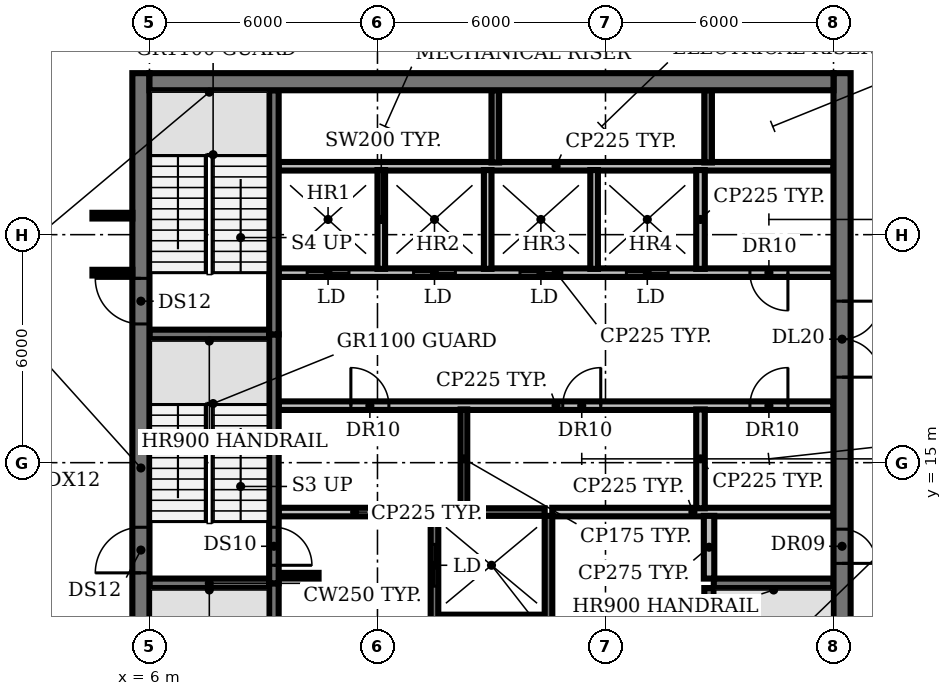
"""IFC4 building model, lengths in metres.
Left out: names, types, materials, properties, quantities, classifications, styles, units other than length and angle.
Written with IfcOpenShell. Run it as: python <this file> out.ifc"""

import sys

from ifc_helpers import new_model, si_unit, direction, frame, frame_2d, origin, place, context, subcontext, project, spatial, rectangle, extrude, element, fill, save


model = new_model("IFC4")
c1 = context("Model", 3, precision=1e-05, world=origin(), true_north=direction((0.0, 1.0)))
c2 = subcontext(c1, "Body", "Model", "MODEL_VIEW")
j1 = project(units=[si_unit("LENGTHUNIT", "METRE"), si_unit("PLANEANGLEUNIT", "RADIAN")], contexts=[c1])
p1 = place(None, origin())
s1 = spatial("IfcSite", under=j1, at=p1, CompositionType="ELEMENT")
p2 = place(p1, origin())
s2 = spatial("IfcBuilding", under=s1, at=p2, CompositionType="ELEMENT")
p3 = place(p2, frame((0.0, 0.0, 251.6)))
s3 = spatial("IfcBuildingStorey", under=s2, at=p3, CompositionType="ELEMENT", Elevation=251.6)
p4 = place(p3, frame((13.6, 10.9, 0.0), z_axis=(0.0, 0.0, 1.0), x_axis=(1.0, 0.0, 0.0)))
e1 = element("IfcWall", 1, at=p4, inside=s3, PredefinedType="SHEAR", context=c2, shape_type="SweptSolid", body=[
    extrude(rectangle(XDim=2.8, YDim=0.2, at=frame_2d((1.4, 0.0))), origin(), (0.0, 0.0, 1.0), 3.8),
])
for number, where, z_axis, x_axis in (
    (2, (6.0, 11.825, 0.0), (0.0, 0.0, 1.0), (1.0, 0.0, 0.0)),
    (3, (20.85, 11.825, 0.0), (0.0, 0.0, 1.0), (1.0, 0.0, 0.0)),
):
    element("IfcWall", number, at=place(p3, frame(where, z_axis=z_axis, x_axis=x_axis)), inside=s3, PredefinedType="SHEAR", context=c2, shape_type="SweptSolid", body=[
        extrude(rectangle(XDim=3.15, YDim=0.25, at=frame_2d((1.575, 0.0))), origin(), (0.0, 0.0, 1.0), 3.8),
    ])
p5 = place(p3, frame((9.4, 12.025, 0.0), z_axis=(0.0, 0.0, 1.0), x_axis=(1.0, 0.0, 0.0)))
e4 = element("IfcWall", 4, at=p5, inside=s3, PredefinedType="SHEAR", context=c2, shape_type="SweptSolid", body=[
    extrude(rectangle(XDim=1.05, YDim=0.15, at=frame_2d((0.525, 0.0))), origin(), (0.0, 0.0, 1.0), 3.8),
])
p6 = place(p3, frame((9.4, 13.7, 0.0), z_axis=(0.0, 0.0, 1.0), x_axis=(1.0, 0.0, 0.0)))
e5 = element("IfcWall", 5, at=p6, inside=s3, PredefinedType="PARTITIONING", context=c2, shape_type="SweptSolid", body=[
    extrude(rectangle(XDim=4.0, YDim=0.225, at=frame_2d((2.0, 0.0))), origin(), (0.0, 0.0, 1.0), 3.8),
])
p7 = place(p3, frame((13.6, 13.7, 0.0), z_axis=(0.0, 0.0, 1.0), x_axis=(1.0, 0.0, 0.0)))
e6 = element("IfcWall", 6, at=p7, inside=s3, PredefinedType="SHEAR", context=c2, shape_type="SweptSolid", body=[
    extrude(rectangle(XDim=2.8, YDim=0.2, at=frame_2d((1.4, 0.0))), origin(), (0.0, 0.0, 1.0), 3.8),
])
p8 = place(p3, frame((16.6, 13.7, 0.0), z_axis=(0.0, 0.0, 1.0), x_axis=(1.0, 0.0, 0.0)))
e7 = element("IfcWall", 7, at=p8, inside=s3, PredefinedType="PARTITIONING", context=c2, shape_type="SweptSolid", body=[
    extrude(rectangle(XDim=7.4, YDim=0.225, at=frame_2d((3.7, 0.0))), origin(), (0.0, 0.0, 1.0), 3.8),
])
p9 = place(p3, frame((9.4, 16.5, 0.0), z_axis=(0.0, 0.0, 1.0), x_axis=(1.0, 0.0, 0.0)))
e8 = element("IfcWall", 8, at=p9, inside=s3, PredefinedType="PARTITIONING", context=c2, shape_type="SweptSolid", body=[
    extrude(rectangle(XDim=14.6, YDim=0.225, at=frame_2d((7.3, 0.0))), origin(), (0.0, 0.0, 1.0), 3.8),
])
p10 = place(p9, frame((1.9, 0.0, 0.0)))
e9 = element("IfcOpeningElement", 9, at=p10, cuts=e8, PredefinedType="OPENING", context=c2, shape_type="SweptSolid", body=[
    extrude(rectangle(XDim=1.0, YDim=2.1, at=frame_2d((0.5, 1.05))), frame((0.0, 0.123, 0.0), z_axis=(0.0, -1.0, 0.0), x_axis=(1.0, 0.0, 0.0)), (0.0, 0.0, 1.0), 0.245),
])
p11 = place(p9, frame((7.475, 0.0, 0.0)))
e10 = element("IfcOpeningElement", 10, at=p11, cuts=e8, PredefinedType="OPENING", context=c2, shape_type="SweptSolid", body=[
    extrude(rectangle(XDim=1.0, YDim=2.1, at=frame_2d((0.5, 1.05))), frame((0.0, 0.123, 0.0), z_axis=(0.0, -1.0, 0.0), x_axis=(1.0, 0.0, 0.0)), (0.0, 0.0, 1.0), 0.245),
])
p12 = place(p9, frame((12.4, 0.0, 0.0)))
e11 = element("IfcOpeningElement", 11, at=p12, cuts=e8, PredefinedType="OPENING", context=c2, shape_type="SweptSolid", body=[
    extrude(rectangle(XDim=1.0, YDim=2.1, at=frame_2d((0.5, 1.05))), frame((0.0, 0.123, 0.0), z_axis=(0.0, -1.0, 0.0), x_axis=(1.0, 0.0, 0.0)), (0.0, 0.0, 1.0), 0.245),
])
p13 = place(p3, frame((6.0, 18.375, 0.0), z_axis=(0.0, 0.0, 1.0), x_axis=(1.0, 0.0, 0.0)))
e12 = element("IfcWall", 12, at=p13, inside=s3, PredefinedType="SHEAR", context=c2, shape_type="SweptSolid", body=[
    extrude(rectangle(XDim=3.15, YDim=0.25, at=frame_2d((1.575, 0.0))), origin(), (0.0, 0.0, 1.0), 3.8),
])
p14 = place(p3, frame((24.0, 20.0, 0.0), z_axis=(0.0, 0.0, 1.0), x_axis=(-1.0, 0.0, 0.0)))
e13 = element("IfcWall", 13, at=p14, inside=s3, PredefinedType="PARTITIONING", context=c2, shape_type="SweptSolid", body=[
    extrude(rectangle(XDim=14.6, YDim=0.225, at=frame_2d((7.3, 0.0))), origin(), (0.0, 0.0, 1.0), 3.8),
])
p15 = place(p14, frame((12.75, 0.0, 0.0)))
e14 = element("IfcOpeningElement", 14, at=p15, cuts=e13, PredefinedType="OPENING", context=c2, shape_type="SweptSolid", body=[
    extrude(rectangle(XDim=1.1, YDim=2.1, at=frame_2d((0.55, 1.05))), frame((0.0, 0.123, 0.0), z_axis=(0.0, -1.0, 0.0), x_axis=(1.0, 0.0, 0.0)), (0.0, 0.0, 1.0), 0.245),
])
p16 = place(p14, frame((9.95, 0.0, 0.0)))
e15 = element("IfcOpeningElement", 15, at=p16, cuts=e13, PredefinedType="OPENING", context=c2, shape_type="SweptSolid", body=[
    extrude(rectangle(XDim=1.1, YDim=2.1, at=frame_2d((0.55, 1.05))), frame((0.0, 0.123, 0.0), z_axis=(0.0, -1.0, 0.0), x_axis=(1.0, 0.0, 0.0)), (0.0, 0.0, 1.0), 0.245),
])
p17 = place(p14, frame((7.15, 0.0, 0.0)))
e16 = element("IfcOpeningElement", 16, at=p17, cuts=e13, PredefinedType="OPENING", context=c2, shape_type="SweptSolid", body=[
    extrude(rectangle(XDim=1.1, YDim=2.1, at=frame_2d((0.55, 1.05))), frame((0.0, 0.123, 0.0), z_axis=(0.0, -1.0, 0.0), x_axis=(1.0, 0.0, 0.0)), (0.0, 0.0, 1.0), 0.245),
])
p18 = place(p14, frame((4.35, 0.0, 0.0)))
e17 = element("IfcOpeningElement", 17, at=p18, cuts=e13, PredefinedType="OPENING", context=c2, shape_type="SweptSolid", body=[
    extrude(rectangle(XDim=1.1, YDim=2.1, at=frame_2d((0.55, 1.05))), frame((0.0, 0.123, 0.0), z_axis=(0.0, -1.0, 0.0), x_axis=(1.0, 0.0, 0.0)), (0.0, 0.0, 1.0), 0.245),
])
p19 = place(p14, frame((1.2, 0.0, 0.0)))
e18 = element("IfcOpeningElement", 18, at=p19, cuts=e13, PredefinedType="OPENING", context=c2, shape_type="SweptSolid", body=[
    extrude(rectangle(XDim=1.0, YDim=2.1, at=frame_2d((0.5, 1.05))), frame((0.0, 0.123, 0.0), z_axis=(0.0, -1.0, 0.0), x_axis=(1.0, 0.0, 0.0)), (0.0, 0.0, 1.0), 0.245),
])
p20 = place(p3, frame((9.4, 22.8, 0.0), z_axis=(0.0, 0.0, 1.0), x_axis=(1.0, 0.0, 0.0)))
e19 = element("IfcWall", 19, at=p20, inside=s3, PredefinedType="PARTITIONING", context=c2, shape_type="SweptSolid", body=[
    extrude(rectangle(XDim=14.6, YDim=0.225, at=frame_2d((7.3, 0.0))), origin(), (0.0, 0.0, 1.0), 3.8),
])
p21 = place(p3, frame((9.275, 11.825, 0.0), z_axis=(0.0, 0.0, 1.0), x_axis=(0.0, -1.0, 0.0)))
e20 = element("IfcWall", 20, at=p21, inside=s3, PredefinedType="SHEAR", context=c2, shape_type="SweptSolid", body=[
    extrude(rectangle(XDim=6.425, YDim=0.25, at=frame_2d((3.212, 0.0))), origin(), (0.0, 0.0, 1.0), 3.8),
])
p22 = place(p21, frame((5.075, 0.0, 0.0)))
e21 = element("IfcOpeningElement", 21, at=p22, cuts=e20, PredefinedType="OPENING", context=c2, shape_type="SweptSolid", body=[
    extrude(rectangle(XDim=1.0, YDim=2.1, at=frame_2d((0.5, 1.05))), frame((0.0, 0.135, 0.0), z_axis=(0.0, -1.0, 0.0), x_axis=(1.0, 0.0, 0.0)), (0.0, 0.0, 1.0), 0.27),
])
p23 = place(p3, frame((9.275, 18.375, 0.0), z_axis=(0.0, 0.0, 1.0), x_axis=(0.0, -1.0, 0.0)))
e22 = element("IfcWall", 22, at=p23, inside=s3, PredefinedType="SHEAR", context=c2, shape_type="SweptSolid", body=[
    extrude(rectangle(XDim=6.55, YDim=0.25, at=frame_2d((3.275, 0.0))), origin(), (0.0, 0.0, 1.0), 3.8),
])
p24 = place(p23, frame((5.075, 0.0, 0.0)))
e23 = element("IfcOpeningElement", 23, at=p24, cuts=e22, PredefinedType="OPENING", context=c2, shape_type="SweptSolid", body=[
    extrude(rectangle(XDim=1.0, YDim=2.1, at=frame_2d((0.5, 1.05))), frame((0.0, 0.135, 0.0), z_axis=(0.0, -1.0, 0.0), x_axis=(1.0, 0.0, 0.0)), (0.0, 0.0, 1.0), 0.27),
])
p25 = place(p3, frame((9.275, 18.375, 0.0), z_axis=(0.0, 0.0, 1.0), x_axis=(0.0, 1.0, 0.0)))
e24 = element("IfcWall", 24, at=p25, inside=s3, PredefinedType="SHEAR", context=c2, shape_type="SweptSolid", body=[
    extrude(rectangle(XDim=6.425, YDim=0.25, at=frame_2d((3.212, 0.0))), origin(), (0.0, 0.0, 1.0), 3.8),
])
p26 = place(p3, frame((12.1, 20.1, 0.0), z_axis=(0.0, 0.0, 1.0), x_axis=(0.0, 1.0, 0.0)))
e25 = element("IfcWall", 25, at=p26, inside=s3, PredefinedType="SOLIDWALL", context=c2, shape_type="SweptSolid", body=[
    extrude(rectangle(XDim=2.6, YDim=0.2, at=frame_2d((1.3, 0.0))), origin(), (0.0, 0.0, 1.0), 3.8),
])
p27 = place(p3, frame((13.5, 5.4, 0.0), z_axis=(0.0, 0.0, 1.0), x_axis=(0.0, 1.0, 0.0)))
e26 = element("IfcWall", 26, at=p27, inside=s3, PredefinedType="SHEAR", context=c2, shape_type="SweptSolid", body=[
    extrude(rectangle(XDim=8.2, YDim=0.2, at=frame_2d((4.1, 0.0))), origin(), (0.0, 0.0, 1.0), 3.8),
])
p28 = place(p27, frame((0.75, 0.0, 0.0)))
e27 = element("IfcOpeningElement", 27, at=p28, cuts=e26, PredefinedType="OPENING", context=c2, shape_type="SweptSolid", body=[
    extrude(rectangle(XDim=1.1, YDim=2.1, at=frame_2d((0.55, 1.05))), frame((0.0, 0.11, 0.0), z_axis=(0.0, -1.0, 0.0), x_axis=(1.0, 0.0, 0.0)), (0.0, 0.0, 1.0), 0.22),
])
p29 = place(p27, frame((3.55, 0.0, 0.0)))
e28 = element("IfcOpeningElement", 28, at=p29, cuts=e26, PredefinedType="OPENING", context=c2, shape_type="SweptSolid", body=[
    extrude(rectangle(XDim=1.1, YDim=2.1, at=frame_2d((0.55, 1.05))), frame((0.0, 0.11, 0.0), z_axis=(0.0, -1.0, 0.0), x_axis=(1.0, 0.0, 0.0)), (0.0, 0.0, 1.0), 0.22),
])
p30 = place(p27, frame((6.35, 0.0, 0.0)))
e29 = element("IfcOpeningElement", 29, at=p30, cuts=e26, PredefinedType="OPENING", context=c2, shape_type="SweptSolid", body=[
    extrude(rectangle(XDim=1.1, YDim=2.1, at=frame_2d((0.55, 1.05))), frame((0.0, 0.11, 0.0), z_axis=(0.0, -1.0, 0.0), x_axis=(1.0, 0.0, 0.0)), (0.0, 0.0, 1.0), 0.22),
])
p31 = place(p3, frame((14.275, 13.8, 0.0), z_axis=(0.0, 0.0, 1.0), x_axis=(0.0, 1.0, 0.0)))
e30 = element("IfcWall", 30, at=p31, inside=s3, PredefinedType="PARTITIONING", context=c2, shape_type="SweptSolid", body=[
    extrude(rectangle(XDim=2.6, YDim=0.175, at=frame_2d((1.3, 0.0))), origin(), (0.0, 0.0, 1.0), 3.8),
])
p32 = place(p3, frame((14.9, 20.1, 0.0), z_axis=(0.0, 0.0, 1.0), x_axis=(0.0, 1.0, 0.0)))
e31 = element("IfcWall", 31, at=p32, inside=s3, PredefinedType="SOLIDWALL", context=c2, shape_type="SweptSolid", body=[
    extrude(rectangle(XDim=2.6, YDim=0.2, at=frame_2d((1.3, 0.0))), origin(), (0.0, 0.0, 1.0), 3.8),
])
p33 = place(p3, frame((15.1, 22.9, 0.0), z_axis=(0.0, 0.0, 1.0), x_axis=(0.0, 1.0, 0.0)))
e32 = element("IfcWall", 32, at=p33, inside=s3, PredefinedType="SHEAR", context=c2, shape_type="SweptSolid", body=[
    extrude(rectangle(XDim=1.9, YDim=0.2, at=frame_2d((0.95, 0.0))), origin(), (0.0, 0.0, 1.0), 3.8),
])
p34 = place(p3, frame((16.5, 5.4, 0.0), z_axis=(0.0, 0.0, 1.0), x_axis=(0.0, 1.0, 0.0)))
e33 = element("IfcWall", 33, at=p34, inside=s3, PredefinedType="SHEAR", context=c2, shape_type="SweptSolid", body=[
    extrude(rectangle(XDim=8.2, YDim=0.2, at=frame_2d((4.1, 0.0))), origin(), (0.0, 0.0, 1.0), 3.8),
])
p35 = place(p3, frame((17.7, 20.1, 0.0), z_axis=(0.0, 0.0, 1.0), x_axis=(0.0, 1.0, 0.0)))
e34 = element("IfcWall", 34, at=p35, inside=s3, PredefinedType="SOLIDWALL", context=c2, shape_type="SweptSolid", body=[
    extrude(rectangle(XDim=2.6, YDim=0.2, at=frame_2d((1.3, 0.0))), origin(), (0.0, 0.0, 1.0), 3.8),
])
for number, where, z_axis, x_axis in (
    (35, (20.5, 13.8, 0.0), (0.0, 0.0, 1.0), (0.0, 1.0, 0.0)),
    (36, (20.5, 20.1, 0.0), (0.0, 0.0, 1.0), (0.0, 1.0, 0.0)),
):
    element("IfcWall", number, at=place(p3, frame(where, z_axis=z_axis, x_axis=x_axis)), inside=s3, PredefinedType="PARTITIONING", context=c2, shape_type="SweptSolid", body=[
        extrude(rectangle(XDim=2.6, YDim=0.225, at=frame_2d((1.3, 0.0))), origin(), (0.0, 0.0, 1.0), 3.8),
    ])
p36 = place(p3, frame((20.7, 22.9, 0.0), z_axis=(0.0, 0.0, 1.0), x_axis=(0.0, 1.0, 0.0)))
e37 = element("IfcWall", 37, at=p36, inside=s3, PredefinedType="SHEAR", context=c2, shape_type="SweptSolid", body=[
    extrude(rectangle(XDim=1.9, YDim=0.2, at=frame_2d((0.95, 0.0))), origin(), (0.0, 0.0, 1.0), 3.8),
])
p37 = place(p3, frame((20.725, 5.4, 0.0), z_axis=(0.0, 0.0, 1.0), x_axis=(0.0, 1.0, 0.0)))
e38 = element("IfcWall", 38, at=p37, inside=s3, PredefinedType="SHEAR", context=c2, shape_type="SweptSolid", body=[
    extrude(rectangle(XDim=6.3, YDim=0.25, at=frame_2d((3.15, 0.0))), origin(), (0.0, 0.0, 1.0), 3.8),
])
p38 = place(p3, frame((20.725, 11.95, 0.0), z_axis=(0.0, 0.0, 1.0), x_axis=(0.0, 1.0, 0.0)))
e39 = element("IfcWall", 39, at=p38, inside=s3, PredefinedType="PARTITIONING", context=c2, shape_type="SweptSolid", body=[
    extrude(rectangle(XDim=1.65, YDim=0.275, at=frame_2d((0.825, 0.0))), origin(), (0.0, 0.0, 1.0), 3.8),
])
p39 = place(p3, frame((5.775, 4.47, 0.0), z_axis=(0.0, 0.0, 1.0), x_axis=(0.0, 1.0, 0.0)))
e40 = element("IfcWall", 40, at=p39, inside=s3, PredefinedType="SHEAR", context=c2, shape_type="SweptSolid", body=[
    extrude(rectangle(XDim=20.78, YDim=0.45, at=frame_2d((10.39, 0.0))), origin(), (0.0, 0.0, 1.0), 3.8),
])
p40 = place(p39, frame((1.18, 0.0, 0.0)))
e41 = element("IfcOpeningElement", 41, at=p40, cuts=e40, PredefinedType="OPENING", context=c2, shape_type="SweptSolid", body=[
    extrude(rectangle(XDim=1.5, YDim=2.1, at=frame_2d((0.75, 1.05))), frame((0.0, 0.235, 0.0), z_axis=(0.0, -1.0, 0.0), x_axis=(1.0, 0.0, 0.0)), (0.0, 0.0, 1.0), 0.47),
])
p41 = place(p39, frame((7.63, 0.0, 0.0)))
e42 = element("IfcOpeningElement", 42, at=p41, cuts=e40, PredefinedType="OPENING", context=c2, shape_type="SweptSolid", body=[
    extrude(rectangle(XDim=1.2, YDim=2.1, at=frame_2d((0.6, 1.05))), frame((0.0, 0.235, 0.0), z_axis=(0.0, -1.0, 0.0), x_axis=(1.0, 0.0, 0.0)), (0.0, 0.0, 1.0), 0.47),
])
p42 = place(p39, frame((14.18, 0.0, 0.0)))
e43 = element("IfcOpeningElement", 43, at=p42, cuts=e40, PredefinedType="OPENING", context=c2, shape_type="SweptSolid", body=[
    extrude(rectangle(XDim=1.2, YDim=2.1, at=frame_2d((0.6, 1.05))), frame((0.0, 0.235, 0.0), z_axis=(0.0, -1.0, 0.0), x_axis=(1.0, 0.0, 0.0)), (0.0, 0.0, 1.0), 0.47),
])
p43 = place(p3, frame((24.225, 25.25, 0.0), z_axis=(0.0, 0.0, 1.0), x_axis=(0.0, -1.0, 0.0)))
e44 = element("IfcWall", 44, at=p43, inside=s3, PredefinedType="SHEAR", context=c2, shape_type="SweptSolid", body=[
    extrude(rectangle(XDim=20.78, YDim=0.45, at=frame_2d((10.39, 0.0))), origin(), (0.0, 0.0, 1.0), 3.8),
])
p44 = place(p43, frame((18.1, 0.0, 0.0)))
e45 = element("IfcOpeningElement", 45, at=p44, cuts=e44, PredefinedType="OPENING", context=c2, shape_type="SweptSolid", body=[
    extrude(rectangle(XDim=1.5, YDim=2.1, at=frame_2d((0.75, 1.05))), frame((0.0, 0.235, 0.0), z_axis=(0.0, -1.0, 0.0), x_axis=(1.0, 0.0, 0.0)), (0.0, 0.0, 1.0), 0.47),
])
p45 = place(p43, frame((12.0, 0.0, 0.0)))
e46 = element("IfcOpeningElement", 46, at=p45, cuts=e44, PredefinedType="OPENING", context=c2, shape_type="SweptSolid", body=[
    extrude(rectangle(XDim=0.9, YDim=2.1, at=frame_2d((0.45, 1.05))), frame((0.0, 0.235, 0.0), z_axis=(0.0, -1.0, 0.0), x_axis=(1.0, 0.0, 0.0)), (0.0, 0.0, 1.0), 0.47),
])
p46 = place(p43, frame((6.0, 0.0, 0.0)))
e47 = element("IfcOpeningElement", 47, at=p46, cuts=e44, PredefinedType="OPENING", context=c2, shape_type="SweptSolid", body=[
    extrude(rectangle(XDim=2.0, YDim=2.1, at=frame_2d((1.0, 1.05))), frame((0.0, 0.235, 0.0), z_axis=(0.0, -1.0, 0.0), x_axis=(1.0, 0.0, 0.0)), (0.0, 0.0, 1.0), 0.47),
])
p47 = place(p3, frame((6.0, 25.025, 0.0), z_axis=(0.0, 0.0, 1.0), x_axis=(1.0, 0.0, 0.0)))
e48 = element("IfcWall", 48, at=p47, inside=s3, PredefinedType="SHEAR", context=c2, shape_type="SweptSolid", body=[
    extrude(rectangle(XDim=18.0, YDim=0.45, at=frame_2d((9.0, 0.0))), origin(), (0.0, 0.0, 1.0), 3.8),
])
for number, where, z_axis, x_axis in (
    (49, (4.5, 20.0, 0.0), (0.0, 0.0, 1.0), (1.0, 0.0, 0.0)),
    (50, (4.5, 21.5, 0.0), (0.0, 0.0, 1.0), (1.0, 0.0, 0.0)),
):
    element("IfcWall", number, at=place(p3, frame(where, z_axis=z_axis, x_axis=x_axis)), inside=s3, PredefinedType="PARTITIONING", context=c2, shape_type="SweptSolid", body=[
        extrude(rectangle(XDim=1.05, YDim=0.15, at=frame_2d((0.525, 0.0))), origin(), (0.0, 0.0, 1.0), 2.83),
    ])
p48 = place(p10, origin())
e51 = element("IfcDoor", 51, at=p48, inside=s3, OperationType="SINGLE_SWING_LEFT", PredefinedType="DOOR", context=c2, shape_type="SweptSolid", body=[
    extrude(rectangle(XDim=1.0, YDim=2.1, at=frame_2d((0.5, 1.05))), frame((0.0, 0.025, 0.0), z_axis=(0.0, -1.0, 0.0), x_axis=(1.0, 0.0, 0.0)), (0.0, 0.0, 1.0), 0.05),
])
fill(e9, e51)
p49 = place(p11, origin())
e52 = element("IfcDoor", 52, at=p49, inside=s3, OperationType="SINGLE_SWING_RIGHT", PredefinedType="DOOR", context=c2, shape_type="SweptSolid", body=[
    extrude(rectangle(XDim=1.0, YDim=2.1, at=frame_2d((0.5, 1.05))), frame((0.0, 0.025, 0.0), z_axis=(0.0, -1.0, 0.0), x_axis=(1.0, 0.0, 0.0)), (0.0, 0.0, 1.0), 0.05),
])
fill(e10, e52)
p50 = place(p12, origin())
e53 = element("IfcDoor", 53, at=p50, inside=s3, OperationType="SINGLE_SWING_RIGHT", PredefinedType="DOOR", context=c2, shape_type="SweptSolid", body=[
    extrude(rectangle(XDim=1.0, YDim=2.1, at=frame_2d((0.5, 1.05))), frame((0.0, 0.025, 0.0), z_axis=(0.0, -1.0, 0.0), x_axis=(1.0, 0.0, 0.0)), (0.0, 0.0, 1.0), 0.05),
])
fill(e11, e53)
p51 = place(p15, origin())
e54 = element("IfcDoor", 54, at=p51, inside=s3, OperationType="DOUBLE_DOOR_SLIDING", PredefinedType="DOOR", context=c2, shape_type="SweptSolid", body=[
    extrude(rectangle(XDim=1.1, YDim=2.1, at=frame_2d((0.55, 1.05))), frame((0.0, 0.025, 0.0), z_axis=(0.0, -1.0, 0.0), x_axis=(1.0, 0.0, 0.0)), (0.0, 0.0, 1.0), 0.05),
])
fill(e14, e54)
p52 = place(p16, origin())
e55 = element("IfcDoor", 55, at=p52, inside=s3, OperationType="DOUBLE_DOOR_SLIDING", PredefinedType="DOOR", context=c2, shape_type="SweptSolid", body=[
    extrude(rectangle(XDim=1.1, YDim=2.1, at=frame_2d((0.55, 1.05))), frame((0.0, 0.025, 0.0), z_axis=(0.0, -1.0, 0.0), x_axis=(1.0, 0.0, 0.0)), (0.0, 0.0, 1.0), 0.05),
])
fill(e15, e55)
p53 = place(p17, origin())
e56 = element("IfcDoor", 56, at=p53, inside=s3, OperationType="DOUBLE_DOOR_SLIDING", PredefinedType="DOOR", context=c2, shape_type="SweptSolid", body=[
    extrude(rectangle(XDim=1.1, YDim=2.1, at=frame_2d((0.55, 1.05))), frame((0.0, 0.025, 0.0), z_axis=(0.0, -1.0, 0.0), x_axis=(1.0, 0.0, 0.0)), (0.0, 0.0, 1.0), 0.05),
])
fill(e16, e56)
p54 = place(p18, origin())
e57 = element("IfcDoor", 57, at=p54, inside=s3, OperationType="DOUBLE_DOOR_SLIDING", PredefinedType="DOOR", context=c2, shape_type="SweptSolid", body=[
    extrude(rectangle(XDim=1.1, YDim=2.1, at=frame_2d((0.55, 1.05))), frame((0.0, 0.025, 0.0), z_axis=(0.0, -1.0, 0.0), x_axis=(1.0, 0.0, 0.0)), (0.0, 0.0, 1.0), 0.05),
])
fill(e17, e57)
p55 = place(p19, origin())
e58 = element("IfcDoor", 58, at=p55, inside=s3, OperationType="SINGLE_SWING_LEFT", PredefinedType="DOOR", context=c2, shape_type="SweptSolid", body=[
    extrude(rectangle(XDim=1.0, YDim=2.1, at=frame_2d((0.5, 1.05))), frame((0.0, 0.025, 0.0), z_axis=(0.0, -1.0, 0.0), x_axis=(1.0, 0.0, 0.0)), (0.0, 0.0, 1.0), 0.05),
])
fill(e18, e58)
p56 = place(p24, origin())
e59 = element("IfcDoor", 59, at=p56, inside=s3, OperationType="SINGLE_SWING_RIGHT", PredefinedType="DOOR", context=c2, shape_type="SweptSolid", body=[
    extrude(rectangle(XDim=1.0, YDim=2.1, at=frame_2d((0.5, 1.05))), frame((0.0, 0.025, 0.0), z_axis=(0.0, -1.0, 0.0), x_axis=(1.0, 0.0, 0.0)), (0.0, 0.0, 1.0), 0.05),
])
fill(e23, e59)
p57 = place(p30, origin())
e60 = element("IfcDoor", 60, at=p57, inside=s3, OperationType="DOUBLE_DOOR_SLIDING", PredefinedType="DOOR", context=c2, shape_type="SweptSolid", body=[
    extrude(rectangle(XDim=1.1, YDim=2.1, at=frame_2d((0.55, 1.05))), frame((0.0, 0.025, 0.0), z_axis=(0.0, -1.0, 0.0), x_axis=(1.0, 0.0, 0.0)), (0.0, 0.0, 1.0), 0.05),
])
fill(e29, e60)
p58 = place(p41, origin())
e61 = element("IfcDoor", 61, at=p58, inside=s3, OperationType="SINGLE_SWING_LEFT", PredefinedType="DOOR", context=c2, shape_type="SweptSolid", body=[
    extrude(rectangle(XDim=1.2, YDim=2.1, at=frame_2d((0.6, 1.05))), frame((0.0, 0.025, 0.0), z_axis=(0.0, -1.0, 0.0), x_axis=(1.0, 0.0, 0.0)), (0.0, 0.0, 1.0), 0.05),
])
fill(e42, e61)
p59 = place(p42, origin())
e62 = element("IfcDoor", 62, at=p59, inside=s3, OperationType="SINGLE_SWING_RIGHT", PredefinedType="DOOR", context=c2, shape_type="SweptSolid", body=[
    extrude(rectangle(XDim=1.2, YDim=2.1, at=frame_2d((0.6, 1.05))), frame((0.0, 0.025, 0.0), z_axis=(0.0, -1.0, 0.0), x_axis=(1.0, 0.0, 0.0)), (0.0, 0.0, 1.0), 0.05),
])
fill(e43, e62)
p60 = place(p45, origin())
e63 = element("IfcDoor", 63, at=p60, inside=s3, OperationType="SINGLE_SWING_RIGHT", PredefinedType="DOOR", context=c2, shape_type="SweptSolid", body=[
    extrude(rectangle(XDim=0.9, YDim=2.1, at=frame_2d((0.45, 1.05))), frame((0.0, 0.025, 0.0), z_axis=(0.0, -1.0, 0.0), x_axis=(1.0, 0.0, 0.0)), (0.0, 0.0, 1.0), 0.05),
])
fill(e46, e63)
p61 = place(p46, origin())
e64 = element("IfcDoor", 64, at=p61, inside=s3, OperationType="DOUBLE_DOOR_SINGLE_SWING", PredefinedType="DOOR", context=c2, shape_type="SweptSolid", body=[
    extrude(rectangle(XDim=2.0, YDim=2.1, at=frame_2d((1.0, 1.05))), frame((0.0, 0.025, 0.0), z_axis=(0.0, -1.0, 0.0), x_axis=(1.0, 0.0, 0.0)), (0.0, 0.0, 1.0), 0.05),
])
fill(e47, e64)
save(model, sys.argv[1])
